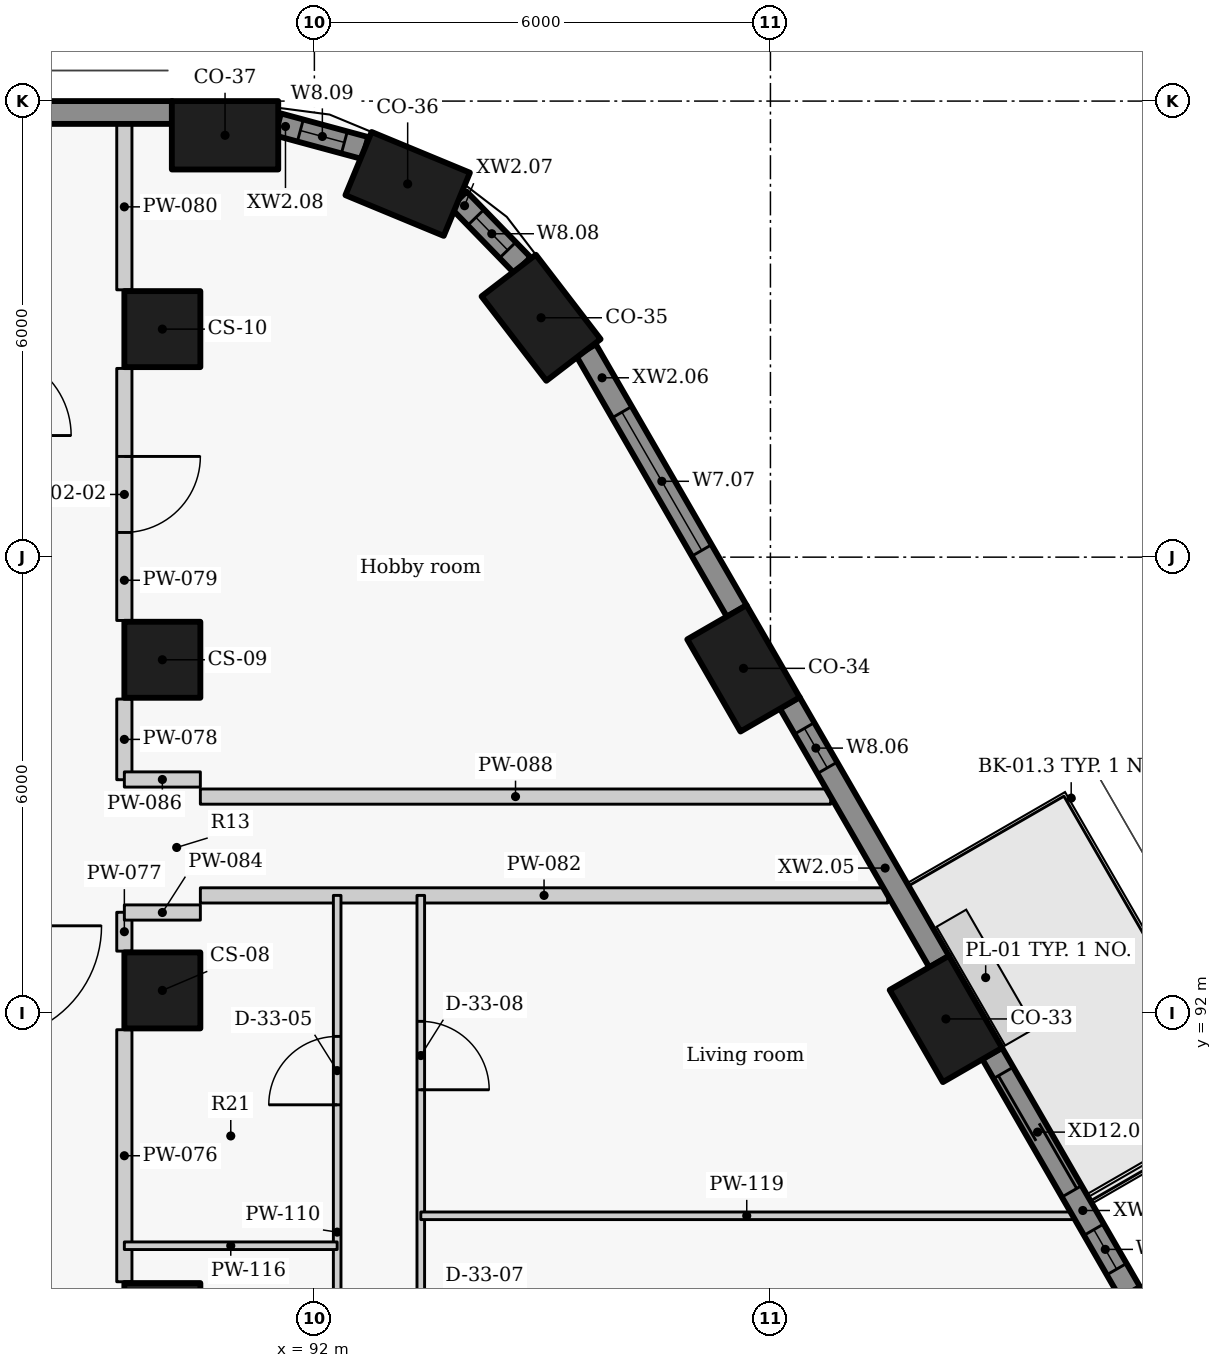
"""IFC4 building model, lengths in metres.
Left out: names, types, materials, properties, quantities, classifications, styles, units other than length and angle.
Written with IfcOpenShell. Run it as: python <this file> out.ifc"""

import sys

from ifc_helpers import new_model, si_unit, direction, frame, frame_2d, origin, origin_2d, place, context, subcontext, project, spatial, rectangle, extrude, element, fill, save


model = new_model("IFC4")
c1 = context("Model", 3, precision=1e-05, world=origin(), true_north=direction((0.0, 1.0)))
c2 = subcontext(c1, "Body", "Model", "MODEL_VIEW")
j1 = project(units=[si_unit("LENGTHUNIT", "METRE"), si_unit("PLANEANGLEUNIT", "RADIAN")], contexts=[c1])
p1 = place(None, origin())
s1 = spatial("IfcSite", under=j1, at=p1, CompositionType="ELEMENT")
p2 = place(p1, origin())
s2 = spatial("IfcBuilding", under=s1, at=p2, CompositionType="ELEMENT")
p3 = place(p2, frame((0.0, 0.0, 77.7)))
s3 = spatial("IfcBuildingStorey", under=s2, at=p3, CompositionType="ELEMENT", Elevation=77.7)
for number, where, z_axis, x_axis in (
    (1, (102.823, 87.57, 0.0), (0.0, 0.0, 1.0), (-0.5, 0.866, 0.0)),
    (2, (100.308, 91.925, 0.0), (0.0, 0.0, 1.0), (-0.5, 0.866, 0.0)),
    (3, (97.646, 96.537, 0.0), (0.0, 0.0, 1.0), (-0.5, 0.866, 0.0)),
    (4, (94.982, 101.149, 0.0), (0.0, 0.0, 1.0), (-0.609, 0.793, 0.0)),
    (5, (93.227, 102.91, 0.0), (0.0, 0.0, 1.0), (-0.924, 0.383, 0.0)),
    (6, (90.825, 103.55, 0.0), (0.0, 0.0, 1.0), (-1.0, 0.0, 0.0)),
):
    element("IfcColumn", number, at=place(p3, frame(where, z_axis=z_axis, x_axis=x_axis)), inside=s3, PredefinedType="COLUMN", context=c2, shape_type="SweptSolid", body=[
        extrude(rectangle(XDim=1.4, YDim=0.9, at=origin_2d()), origin(), (0.0, 0.0, 1.0), 3.3),
    ])
for number, where, z_axis, x_axis in (
    (7, (90.0, 87.95, 0.0), (0.0, 0.0, 1.0), (0.0, 1.0, 0.0)),
    (8, (90.0, 92.3, 0.0), (0.0, 0.0, 1.0), (0.0, 1.0, 0.0)),
    (9, (90.0, 96.65, 0.0), (0.0, 0.0, 1.0), (0.0, 1.0, 0.0)),
    (10, (90.0, 101.0, 0.0), (0.0, 0.0, 1.0), (0.0, 1.0, 0.0)),
):
    element("IfcColumn", number, at=place(p3, frame(where, z_axis=z_axis, x_axis=x_axis)), inside=s3, PredefinedType="COLUMN", context=c2, shape_type="SweptSolid", body=[
        extrude(rectangle(XDim=1.0, YDim=1.0, at=origin_2d()), origin(), (0.0, 0.0, 1.0), 3.3),
    ])
p4 = place(p3, frame((102.735, 88.323, 0.0), z_axis=(0.0, 0.0, 1.0), x_axis=(-0.500009139881, 0.866020126807, 0.0)))
e11 = element("IfcWall", 11, at=p4, inside=s3, PredefinedType="SOLIDWALL", context=c2, shape_type="SweptSolid", body=[
    extrude(rectangle(XDim=3.637, YDim=0.3, at=frame_2d((1.818, 0.0))), origin(), (0.0, 0.0, 1.0), 2.425),
])
p5 = place(p4, frame((1.54, 0.0, 0.0)))
e12 = element("IfcOpeningElement", 12, at=p5, cuts=e11, PredefinedType="OPENING", context=c2, shape_type="SweptSolid", body=[
    extrude(rectangle(XDim=1.8, YDim=2.0, at=frame_2d((0.9, 1.0))), frame((0.0, 0.16, 0.0), z_axis=(0.0, -1.0, 0.0), x_axis=(1.0, 0.0, 0.0)), (0.0, 0.0, 1.0), 0.32),
])
p6 = place(p4, frame((0.359, 0.0, 0.9)))
e13 = element("IfcOpeningElement", 13, at=p6, cuts=e11, PredefinedType="OPENING", context=c2, shape_type="SweptSolid", body=[
    extrude(rectangle(XDim=0.6, YDim=1.1, at=frame_2d((0.3, 0.55))), frame((0.0, 0.16, 0.0), z_axis=(0.0, -1.0, 0.0), x_axis=(1.0, 0.0, 0.0)), (0.0, 0.0, 1.0), 0.32),
])
p7 = place(p3, frame((100.22, 92.677, 0.0), z_axis=(0.0, 0.0, 1.0), x_axis=(-0.499957037901, 0.866050206543, 0.0)))
e14 = element("IfcWall", 14, at=p7, inside=s3, PredefinedType="SOLIDWALL", context=c2, shape_type="SweptSolid", body=[
    extrude(rectangle(XDim=3.934, YDim=0.3, at=frame_2d((1.967, 0.0))), origin(), (0.0, 0.0, 1.0), 2.425),
])
p8 = place(p7, frame((2.945, 0.0, 0.9)))
e15 = element("IfcOpeningElement", 15, at=p8, cuts=e14, PredefinedType="OPENING", context=c2, shape_type="SweptSolid", body=[
    extrude(rectangle(XDim=0.6, YDim=1.1, at=frame_2d((0.3, 0.55))), frame((0.0, 0.16, 0.0), z_axis=(0.0, -1.0, 0.0), x_axis=(1.0, 0.0, 0.0)), (0.0, 0.0, 1.0), 0.32),
])
p9 = place(p3, frame((97.557, 97.29, 0.0), z_axis=(0.0, 0.0, 1.0), x_axis=(-0.500043828347, 0.866000097998, 0.0)))
e16 = element("IfcWall", 16, at=p9, inside=s3, PredefinedType="SOLIDWALL", context=c2, shape_type="SweptSolid", body=[
    extrude(rectangle(XDim=3.968, YDim=0.3, at=frame_2d((1.984, 0.0))), origin(), (0.0, 0.0, 1.0), 2.425),
])
p10 = place(p9, frame((0.922, 0.0, 0.9)))
e17 = element("IfcOpeningElement", 17, at=p10, cuts=e16, PredefinedType="OPENING", context=c2, shape_type="SweptSolid", body=[
    extrude(rectangle(XDim=2.1, YDim=1.1, at=frame_2d((1.05, 0.55))), frame((0.0, 0.16, 0.0), z_axis=(0.0, -1.0, 0.0), x_axis=(1.0, 0.0, 0.0)), (0.0, 0.0, 1.0), 0.32),
])
p11 = place(p3, frame((94.738, 101.839, 0.0), z_axis=(0.0, 0.0, 1.0), x_axis=(-0.697032216592, 0.717039809936, 0.0)))
e18 = element("IfcWall", 18, at=p11, inside=s3, PredefinedType="SOLIDWALL", context=c2, shape_type="SweptSolid", body=[
    extrude(rectangle(XDim=1.208, YDim=0.3, at=frame_2d((0.604, 0.0))), origin(), (0.0, 0.0, 1.0), 2.425),
])
p12 = place(p11, frame((0.279, 0.0, 0.9)))
e19 = element("IfcOpeningElement", 19, at=p12, cuts=e18, PredefinedType="OPENING", context=c2, shape_type="SweptSolid", body=[
    extrude(rectangle(XDim=0.6, YDim=1.1, at=frame_2d((0.3, 0.55))), frame((0.0, 0.16, 0.0), z_axis=(0.0, -1.0, 0.0), x_axis=(1.0, 0.0, 0.0)), (0.0, 0.0, 1.0), 0.32),
])
p13 = place(p3, frame((92.669, 103.382, 0.0), z_axis=(0.0, 0.0, 1.0), x_axis=(-0.965278131029, 0.261224290136, 0.0)))
e20 = element("IfcWall", 20, at=p13, inside=s3, PredefinedType="SOLIDWALL", context=c2, shape_type="SweptSolid", body=[
    extrude(rectangle(XDim=1.19, YDim=0.3, at=frame_2d((0.595, 0.0))), origin(), (0.0, 0.0, 1.0), 2.425),
])
p14 = place(p13, frame((0.285, 0.0, 0.9)))
e21 = element("IfcOpeningElement", 21, at=p14, cuts=e20, PredefinedType="OPENING", context=c2, shape_type="SweptSolid", body=[
    extrude(rectangle(XDim=0.6, YDim=1.1, at=frame_2d((0.3, 0.55))), frame((0.0, 0.16, 0.0), z_axis=(0.0, -1.0, 0.0), x_axis=(1.0, 0.0, 0.0)), (0.0, 0.0, 1.0), 0.32),
])
p15 = place(p3, frame((90.129, 103.85, 0.0), z_axis=(0.0, 0.0, 1.0), x_axis=(-1.0, 0.0, 0.0)))
e22 = element("IfcWall", 22, at=p15, inside=s3, PredefinedType="SOLIDWALL", context=c2, shape_type="SweptSolid", body=[
    extrude(rectangle(XDim=20.291, YDim=0.3, at=frame_2d((10.146, 0.0))), origin(), (0.0, 0.0, 1.0), 2.425),
])
p16 = place(p3, frame((89.5, 88.467, 0.0), z_axis=(0.0, 0.0, 1.0), x_axis=(0.0, 1.0, 0.0)))
e23 = element("IfcWall", 23, at=p16, inside=s3, PredefinedType="PARTITIONING", context=c2, shape_type="SweptSolid", body=[
    extrude(rectangle(XDim=3.316, YDim=0.2, at=frame_2d((1.658, 0.0))), origin(), (0.0, 0.0, 1.0), 3.025),
])
p17 = place(p3, frame((89.5, 92.817, 0.0), z_axis=(0.0, 0.0, 1.0), x_axis=(0.0, 1.0, 0.0)))
e24 = element("IfcWall", 24, at=p17, inside=s3, PredefinedType="PARTITIONING", context=c2, shape_type="SweptSolid", body=[
    extrude(rectangle(XDim=0.511, YDim=0.2, at=frame_2d((0.255, 0.0))), origin(), (0.0, 0.0, 1.0), 3.025),
])
p18 = place(p3, frame((89.5, 95.072, 0.0), z_axis=(0.0, 0.0, 1.0), x_axis=(0.0, 1.0, 0.0)))
e25 = element("IfcWall", 25, at=p18, inside=s3, PredefinedType="PARTITIONING", context=c2, shape_type="SweptSolid", body=[
    extrude(rectangle(XDim=1.061, YDim=0.2, at=frame_2d((0.531, 0.0))), origin(), (0.0, 0.0, 1.0), 3.025),
])
p19 = place(p3, frame((89.5, 100.483, 0.0), z_axis=(0.0, 0.0, 1.0), x_axis=(0.0, -1.0, 0.0)))
e26 = element("IfcWall", 26, at=p19, inside=s3, PredefinedType="PARTITIONING", context=c2, shape_type="SweptSolid", body=[
    extrude(rectangle(XDim=3.316, YDim=0.2, at=frame_2d((1.658, 0.0))), origin(), (0.0, 0.0, 1.0), 3.025),
])
p20 = place(p19, frame((1.158, 0.0, 0.0)))
e27 = element("IfcOpeningElement", 27, at=p20, cuts=e26, PredefinedType="OPENING", context=c2, shape_type="SweptSolid", body=[
    extrude(rectangle(XDim=1.0, YDim=2.1, at=frame_2d((0.5, 1.05))), frame((0.0, 0.11, 0.0), z_axis=(0.0, -1.0, 0.0), x_axis=(1.0, 0.0, 0.0)), (0.0, 0.0, 1.0), 0.22),
])
p21 = place(p3, frame((89.5, 101.517, 0.0), z_axis=(0.0, 0.0, 1.0), x_axis=(0.0, 1.0, 0.0)))
e28 = element("IfcWall", 28, at=p21, inside=s3, PredefinedType="PARTITIONING", context=c2, shape_type="SweptSolid", body=[
    extrude(rectangle(XDim=2.183, YDim=0.2, at=frame_2d((1.091, 0.0))), origin(), (0.0, 0.0, 1.0), 3.025),
])
p22 = place(p3, frame((90.5, 93.55, 0.0), z_axis=(0.0, 0.0, 1.0), x_axis=(1.0, 0.0, 0.0)))
e29 = element("IfcWall", 29, at=p22, inside=s3, PredefinedType="PARTITIONING", context=c2, shape_type="SweptSolid", body=[
    extrude(rectangle(XDim=9.043, YDim=0.2, at=frame_2d((4.521, 0.0))), origin(), (0.0, 0.0, 1.0), 2.405),
])
for number, where, z_axis, x_axis in (
    (30, (89.5, 93.325, 0.0), (0.0, 0.0, 1.0), (1.0, 0.0, 0.0)),
    (31, (89.5, 95.075, 0.0), (0.0, 0.0, 1.0), (1.0, 0.0, 0.0)),
):
    element("IfcWall", number, at=place(p3, frame(where, z_axis=z_axis, x_axis=x_axis)), inside=s3, PredefinedType="PARTITIONING", context=c2, shape_type="SweptSolid", body=[
        extrude(rectangle(XDim=1.0, YDim=0.2, at=frame_2d((0.5, 0.0))), origin(), (0.0, 0.0, 1.0), 2.505),
    ])
p23 = place(p3, frame((90.5, 94.85, 0.0), z_axis=(0.0, 0.0, 1.0), x_axis=(1.0, 0.0, 0.0)))
e32 = element("IfcWall", 32, at=p23, inside=s3, PredefinedType="PARTITIONING", context=c2, shape_type="SweptSolid", body=[
    extrude(rectangle(XDim=8.293, YDim=0.2, at=frame_2d((4.146, 0.0))), origin(), (0.0, 0.0, 1.0), 2.405),
])
p24 = place(p3, frame((92.3, 85.1, 0.0), z_axis=(0.0, 0.0, 1.0), x_axis=(0.0, 1.0, 0.0)))
e33 = element("IfcWall", 33, at=p24, inside=s3, PredefinedType="PARTITIONING", context=c2, shape_type="SweptSolid", body=[
    extrude(rectangle(XDim=8.45, YDim=0.1, at=frame_2d((4.225, 0.0))), origin(), (0.0, 0.0, 1.0), 3.025),
])
p25 = place(p24, frame((1.495, 0.0, 0.0)))
e34 = element("IfcOpeningElement", 34, at=p25, cuts=e33, PredefinedType="OPENING", context=c2, shape_type="SweptSolid", body=[
    extrude(rectangle(XDim=0.85, YDim=2.1, at=frame_2d((0.425, 1.05))), frame((0.0, 0.06, 0.0), z_axis=(0.0, -1.0, 0.0), x_axis=(1.0, 0.0, 0.0)), (0.0, 0.0, 1.0), 0.12),
])
p26 = place(p24, frame((5.695, 0.0, 0.0)))
e35 = element("IfcOpeningElement", 35, at=p26, cuts=e33, PredefinedType="OPENING", context=c2, shape_type="SweptSolid", body=[
    extrude(rectangle(XDim=0.9, YDim=2.1, at=frame_2d((0.45, 1.05))), frame((0.0, 0.06, 0.0), z_axis=(0.0, -1.0, 0.0), x_axis=(1.0, 0.0, 0.0)), (0.0, 0.0, 1.0), 0.12),
])
p27 = place(p3, frame((93.4, 93.55, 0.0), z_axis=(0.0, 0.0, 1.0), x_axis=(0.0, -1.0, 0.0)))
e36 = element("IfcWall", 36, at=p27, inside=s3, PredefinedType="PARTITIONING", context=c2, shape_type="SweptSolid", body=[
    extrude(rectangle(XDim=20.55, YDim=0.1, at=frame_2d((10.275, 0.0))), origin(), (0.0, 0.0, 1.0), 3.025),
])
p28 = place(p27, frame((17.898, 0.0, 0.0)))
e37 = element("IfcOpeningElement", 37, at=p28, cuts=e36, PredefinedType="OPENING", context=c2, shape_type="SweptSolid", body=[
    extrude(rectangle(XDim=0.9, YDim=2.1, at=frame_2d((0.45, 1.05))), frame((0.0, 0.06, 0.0), z_axis=(0.0, -1.0, 0.0), x_axis=(1.0, 0.0, 0.0)), (0.0, 0.0, 1.0), 0.12),
])
p29 = place(p27, frame((14.173, 0.0, 0.0)))
e38 = element("IfcOpeningElement", 38, at=p29, cuts=e36, PredefinedType="OPENING", context=c2, shape_type="SweptSolid", body=[
    extrude(rectangle(XDim=0.9, YDim=2.1, at=frame_2d((0.45, 1.05))), frame((0.0, 0.06, 0.0), z_axis=(0.0, -1.0, 0.0), x_axis=(1.0, 0.0, 0.0)), (0.0, 0.0, 1.0), 0.12),
])
p30 = place(p27, frame((11.124, 0.0, 0.0)))
e39 = element("IfcOpeningElement", 39, at=p30, cuts=e36, PredefinedType="OPENING", context=c2, shape_type="SweptSolid", body=[
    extrude(rectangle(XDim=0.9, YDim=2.1, at=frame_2d((0.45, 1.05))), frame((0.0, 0.06, 0.0), z_axis=(0.0, -1.0, 0.0), x_axis=(1.0, 0.0, 0.0)), (0.0, 0.0, 1.0), 0.12),
])
p31 = place(p27, frame((8.141, 0.0, 0.0)))
e40 = element("IfcOpeningElement", 40, at=p31, cuts=e36, PredefinedType="OPENING", context=c2, shape_type="SweptSolid", body=[
    extrude(rectangle(XDim=0.9, YDim=2.1, at=frame_2d((0.45, 1.05))), frame((0.0, 0.06, 0.0), z_axis=(0.0, -1.0, 0.0), x_axis=(1.0, 0.0, 0.0)), (0.0, 0.0, 1.0), 0.12),
])
p32 = place(p27, frame((5.223, 0.0, 0.0)))
e41 = element("IfcOpeningElement", 41, at=p32, cuts=e36, PredefinedType="OPENING", context=c2, shape_type="SweptSolid", body=[
    extrude(rectangle(XDim=0.9, YDim=2.1, at=frame_2d((0.45, 1.05))), frame((0.0, 0.06, 0.0), z_axis=(0.0, -1.0, 0.0), x_axis=(1.0, 0.0, 0.0)), (0.0, 0.0, 1.0), 0.12),
])
p33 = place(p27, frame((1.657, 0.0, 0.0)))
e42 = element("IfcOpeningElement", 42, at=p33, cuts=e36, PredefinedType="OPENING", context=c2, shape_type="SweptSolid", body=[
    extrude(rectangle(XDim=0.9, YDim=2.1, at=frame_2d((0.45, 1.05))), frame((0.0, 0.06, 0.0), z_axis=(0.0, -1.0, 0.0), x_axis=(1.0, 0.0, 0.0)), (0.0, 0.0, 1.0), 0.12),
])
p34 = place(p3, frame((89.5, 88.941, 0.0), z_axis=(0.0, 0.0, 1.0), x_axis=(1.0, 0.0, 0.0)))
e43 = element("IfcWall", 43, at=p34, inside=s3, PredefinedType="PARTITIONING", context=c2, shape_type="SweptSolid", body=[
    extrude(rectangle(XDim=2.8, YDim=0.1, at=frame_2d((1.4, 0.0))), origin(), (0.0, 0.0, 1.0), 2.505),
])
p35 = place(p3, frame((93.4, 89.335, 0.0), z_axis=(0.0, 0.0, 1.0), x_axis=(1.0, 0.0, 0.0)))
e44 = element("IfcWall", 44, at=p35, inside=s3, PredefinedType="PARTITIONING", context=c2, shape_type="SweptSolid", body=[
    extrude(rectangle(XDim=8.577, YDim=0.1, at=frame_2d((4.288, 0.0))), origin(), (0.0, 0.0, 1.0), 2.405),
])
p36 = place(p5, origin())
e45 = element("IfcDoor", 45, at=p36, inside=s3, OperationType="SLIDING_TO_LEFT", PredefinedType="DOOR", context=c2, shape_type="SweptSolid", body=[
    extrude(rectangle(XDim=1.8, YDim=2.0, at=frame_2d((0.9, 1.0))), frame((0.0, 0.025, 0.0), z_axis=(0.0, -1.0, 0.0), x_axis=(1.0, 0.0, 0.0)), (0.0, 0.0, 1.0), 0.05),
])
fill(e12, e45)
p37 = place(p6, origin())
e46 = element("IfcWindow", 46, at=p37, inside=s3, PartitioningType="SINGLE_PANEL", PredefinedType="WINDOW", context=c2, shape_type="SweptSolid", body=[
    extrude(rectangle(XDim=0.6, YDim=1.1, at=frame_2d((0.3, 0.55))), frame((0.0, 0.03, 0.0), z_axis=(0.0, -1.0, 0.0), x_axis=(1.0, 0.0, 0.0)), (0.0, 0.0, 1.0), 0.06),
])
fill(e13, e46)
p38 = place(p8, origin())
e47 = element("IfcWindow", 47, at=p38, inside=s3, PartitioningType="SINGLE_PANEL", PredefinedType="WINDOW", context=c2, shape_type="SweptSolid", body=[
    extrude(rectangle(XDim=0.6, YDim=1.1, at=frame_2d((0.3, 0.55))), frame((0.0, 0.03, 0.0), z_axis=(0.0, -1.0, 0.0), x_axis=(1.0, 0.0, 0.0)), (0.0, 0.0, 1.0), 0.06),
])
fill(e15, e47)
p39 = place(p10, origin())
e48 = element("IfcWindow", 48, at=p39, inside=s3, PartitioningType="SINGLE_PANEL", PredefinedType="WINDOW", context=c2, shape_type="SweptSolid", body=[
    extrude(rectangle(XDim=2.1, YDim=1.1, at=frame_2d((1.05, 0.55))), frame((0.0, 0.03, 0.0), z_axis=(0.0, -1.0, 0.0), x_axis=(1.0, 0.0, 0.0)), (0.0, 0.0, 1.0), 0.06),
])
fill(e17, e48)
p40 = place(p12, origin())
e49 = element("IfcWindow", 49, at=p40, inside=s3, PartitioningType="SINGLE_PANEL", PredefinedType="WINDOW", context=c2, shape_type="SweptSolid", body=[
    extrude(rectangle(XDim=0.6, YDim=1.1, at=frame_2d((0.3, 0.55))), frame((0.0, 0.03, 0.0), z_axis=(0.0, -1.0, 0.0), x_axis=(1.0, 0.0, 0.0)), (0.0, 0.0, 1.0), 0.06),
])
fill(e19, e49)
p41 = place(p14, origin())
e50 = element("IfcWindow", 50, at=p41, inside=s3, PartitioningType="SINGLE_PANEL", PredefinedType="WINDOW", context=c2, shape_type="SweptSolid", body=[
    extrude(rectangle(XDim=0.6, YDim=1.1, at=frame_2d((0.3, 0.55))), frame((0.0, 0.03, 0.0), z_axis=(0.0, -1.0, 0.0), x_axis=(1.0, 0.0, 0.0)), (0.0, 0.0, 1.0), 0.06),
])
fill(e21, e50)
p42 = place(p26, origin())
e51 = element("IfcDoor", 51, at=p42, inside=s3, OperationType="SINGLE_SWING_LEFT", PredefinedType="DOOR", context=c2, shape_type="SweptSolid", body=[
    extrude(rectangle(XDim=0.9, YDim=2.1, at=frame_2d((0.45, 1.05))), frame((0.0, 0.025, 0.0), z_axis=(0.0, -1.0, 0.0), x_axis=(1.0, 0.0, 0.0)), (0.0, 0.0, 1.0), 0.05),
])
fill(e35, e51)
p43 = place(p33, origin())
e52 = element("IfcDoor", 52, at=p43, inside=s3, OperationType="SINGLE_SWING_RIGHT", PredefinedType="DOOR", context=c2, shape_type="SweptSolid", body=[
    extrude(rectangle(XDim=0.9, YDim=2.1, at=frame_2d((0.45, 1.05))), frame((0.0, 0.025, 0.0), z_axis=(0.0, -1.0, 0.0), x_axis=(1.0, 0.0, 0.0)), (0.0, 0.0, 1.0), 0.05),
])
fill(e42, e52)
p44 = place(p20, origin())
e53 = element("IfcDoor", 53, at=p44, inside=s3, OperationType="SINGLE_SWING_LEFT", PredefinedType="DOOR", context=c2, shape_type="SweptSolid", body=[
    extrude(rectangle(XDim=1.0, YDim=2.1, at=frame_2d((0.5, 1.05))), frame((0.0, 0.025, 0.0), z_axis=(0.0, -1.0, 0.0), x_axis=(1.0, 0.0, 0.0)), (0.0, 0.0, 1.0), 0.05),
])
fill(e27, e53)
save(model, sys.argv[1])
